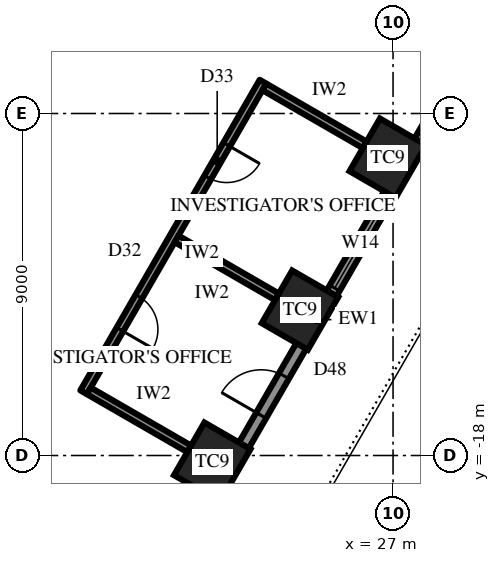
"""IFC4 building model, lengths in metres.
Left out: names, types, materials, properties, quantities, classifications, styles, units other than length and angle.
Written with IfcOpenShell. Run it as: python <this file> out.ifc"""

import sys

from ifc_helpers import new_model, si_unit, direction, frame, frame_2d, origin, origin_2d, place, context, subcontext, project, spatial, rectangle, extrude, element, fill, save


model = new_model("IFC4")
c1 = context("Model", 3, precision=1e-05, world=origin(), true_north=direction((0.0, 1.0)))
c2 = subcontext(c1, "Body", "Model", "MODEL_VIEW")
j1 = project(units=[si_unit("LENGTHUNIT", "METRE"), si_unit("PLANEANGLEUNIT", "RADIAN")], contexts=[c1])
p1 = place(None, origin())
s1 = spatial("IfcSite", under=j1, at=p1, CompositionType="ELEMENT")
p2 = place(p1, origin())
s2 = spatial("IfcBuilding", under=s1, at=p2, CompositionType="ELEMENT")
p3 = place(p2, frame((0.0, 0.0, 232.3)))
s3 = spatial("IfcBuildingStorey", under=s2, at=p3, CompositionType="ELEMENT", Elevation=232.3)
for number, where, z_axis, x_axis in (
    (1, (22.242, -18.175, 0.0), (0.0, 0.0, 1.0), (0.5, 0.866, 0.0)),
    (2, (24.552, -14.175, 0.0), (0.0, 0.0, 1.0), (0.5, 0.866, 0.0)),
    (3, (26.861, -10.175, 0.0), (0.0, 0.0, 1.0), (0.5, 0.866, 0.0)),
):
    element("IfcColumn", number, at=place(p3, frame(where, z_axis=z_axis, x_axis=x_axis)), inside=s3, PredefinedType="COLUMN", context=c2, shape_type="SweptSolid", body=[
        extrude(rectangle(XDim=1.6, YDim=1.4, at=origin_2d()), origin(), (0.0, 0.0, 1.0), 4.2),
    ])
p4 = place(p3, frame((18.707, -25.299, 0.0), z_axis=(0.0, 0.0, 1.0), x_axis=(0.500000442367, 0.866025148383, 0.0)))
e4 = element("IfcWall", 4, at=p4, inside=s3, PredefinedType="SOLIDWALL", context=c2, shape_type="SweptSolid", body=[
    extrude(rectangle(XDim=25.113, YDim=0.3, at=frame_2d((12.556, 0.0))), origin(), (0.0, 0.0, 1.0), 2.8),
])
p5 = place(p4, frame((4.278, 0.0, 0.6)))
e5 = element("IfcOpeningElement", 5, at=p5, cuts=e4, PredefinedType="OPENING", context=c2, shape_type="SweptSolid", body=[
    extrude(rectangle(XDim=2.7, YDim=1.95, at=frame_2d((1.35, 0.975))), frame((0.0, 0.16, 0.0), z_axis=(0.0, -1.0, 0.0), x_axis=(1.0, 0.0, 0.0)), (0.0, 0.0, 1.0), 0.32),
])
p6 = place(p4, frame((9.647, 0.0, 0.0)))
e6 = element("IfcOpeningElement", 6, at=p6, cuts=e4, PredefinedType="OPENING", context=c2, shape_type="SweptSolid", body=[
    extrude(rectangle(XDim=1.2, YDim=2.4, at=frame_2d((0.6, 1.2))), frame((0.0, 0.16, 0.0), z_axis=(0.0, -1.0, 0.0), x_axis=(1.0, 0.0, 0.0)), (0.0, 0.0, 1.0), 0.32),
])
p7 = place(p4, frame((13.516, 0.0, 0.6)))
e7 = element("IfcOpeningElement", 7, at=p7, cuts=e4, PredefinedType="OPENING", context=c2, shape_type="SweptSolid", body=[
    extrude(rectangle(XDim=2.7, YDim=1.95, at=frame_2d((1.35, 0.975))), frame((0.0, 0.16, 0.0), z_axis=(0.0, -1.0, 0.0), x_axis=(1.0, 0.0, 0.0)), (0.0, 0.0, 1.0), 0.32),
])
p8 = place(p4, frame((18.135, 0.0, 0.6)))
e8 = element("IfcOpeningElement", 8, at=p8, cuts=e4, PredefinedType="OPENING", context=c2, shape_type="SweptSolid", body=[
    extrude(rectangle(XDim=2.7, YDim=1.95, at=frame_2d((1.35, 0.975))), frame((0.0, 0.16, 0.0), z_axis=(0.0, -1.0, 0.0), x_axis=(1.0, 0.0, 0.0)), (0.0, 0.0, 1.0), 0.32),
])
p9 = place(p3, frame((18.858, -16.337, 0.0), z_axis=(0.0, 0.0, 1.0), x_axis=(0.499989672313, 0.866031366395, 0.0)))
e9 = element("IfcWall", 9, at=p9, inside=s3, PredefinedType="PARTITIONING", context=c2, shape_type="SweptSolid", body=[
    extrude(rectangle(XDim=9.438, YDim=0.2, at=frame_2d((4.719, 0.0))), origin(), (0.0, 0.0, 1.0), 4.0),
])
p10 = place(p9, frame((1.909, 0.0, 0.0)))
e10 = element("IfcOpeningElement", 10, at=p10, cuts=e9, PredefinedType="OPENING", context=c2, shape_type="SweptSolid", body=[
    extrude(rectangle(XDim=1.0, YDim=2.2, at=frame_2d((0.5, 1.1))), frame((0.0, 0.11, 0.0), z_axis=(0.0, -1.0, 0.0), x_axis=(1.0, 0.0, 0.0)), (0.0, 0.0, 1.0), 0.22),
])
p11 = place(p9, frame((6.528, 0.0, 0.0)))
e11 = element("IfcOpeningElement", 11, at=p11, cuts=e9, PredefinedType="OPENING", context=c2, shape_type="SweptSolid", body=[
    extrude(rectangle(XDim=1.0, YDim=2.2, at=frame_2d((0.5, 1.1))), frame((0.0, 0.11, 0.0), z_axis=(0.0, -1.0, 0.0), x_axis=(1.0, 0.0, 0.0)), (0.0, 0.0, 1.0), 0.22),
])
for number, where, z_axis, x_axis in (
    (12, (18.995, -16.3, 0.0), (0.0, 0.0, 1.0), (0.866, -0.5, 0.0)),
    (13, (21.304, -12.3, 0.0), (0.0, 0.0, 1.0), (0.866, -0.5, 0.0)),
    (14, (23.614, -8.3, 0.0), (0.0, 0.0, 1.0), (0.866, -0.5, 0.0)),
):
    element("IfcWall", number, at=place(p3, frame(where, z_axis=z_axis, x_axis=x_axis)), inside=s3, PredefinedType="PARTITIONING", context=c2, shape_type="SweptSolid", body=[
        extrude(rectangle(XDim=3.05, YDim=0.2, at=frame_2d((1.525, 0.0))), origin(), (0.0, 0.0, 1.0), 3.082),
    ])
p12 = place(p6, origin())
e15 = element("IfcDoor", 15, at=p12, inside=s3, OperationType="SINGLE_SWING_RIGHT", PredefinedType="DOOR", context=c2, shape_type="SweptSolid", body=[
    extrude(rectangle(XDim=1.2, YDim=2.4, at=frame_2d((0.6, 1.2))), frame((0.0, 0.025, 0.0), z_axis=(0.0, -1.0, 0.0), x_axis=(1.0, 0.0, 0.0)), (0.0, 0.0, 1.0), 0.05),
])
fill(e6, e15)
p13 = place(p7, origin())
e16 = element("IfcWindow", 16, at=p13, inside=s3, PartitioningType="SINGLE_PANEL", PredefinedType="WINDOW", context=c2, shape_type="SweptSolid", body=[
    extrude(rectangle(XDim=2.7, YDim=1.95, at=frame_2d((1.35, 0.975))), frame((0.0, 0.03, 0.0), z_axis=(0.0, -1.0, 0.0), x_axis=(1.0, 0.0, 0.0)), (0.0, 0.0, 1.0), 0.06),
])
fill(e7, e16)
p14 = place(p10, frame((1.0, 0.0, 0.0), z_axis=(0.0, 0.0, 1.0), x_axis=(-1.0, 0.0, 0.0)))
e17 = element("IfcDoor", 17, at=p14, inside=s3, OperationType="SINGLE_SWING_LEFT", PredefinedType="DOOR", context=c2, shape_type="SweptSolid", body=[
    extrude(rectangle(XDim=1.0, YDim=2.2, at=frame_2d((0.5, 1.1))), frame((0.0, 0.025, 0.0), z_axis=(0.0, -1.0, 0.0), x_axis=(1.0, 0.0, 0.0)), (0.0, 0.0, 1.0), 0.05),
])
fill(e10, e17)
p15 = place(p11, frame((1.0, 0.0, 0.0), z_axis=(0.0, 0.0, 1.0), x_axis=(-1.0, 0.0, 0.0)))
e18 = element("IfcDoor", 18, at=p15, inside=s3, OperationType="SINGLE_SWING_RIGHT", PredefinedType="DOOR", context=c2, shape_type="SweptSolid", body=[
    extrude(rectangle(XDim=1.0, YDim=2.2, at=frame_2d((0.5, 1.1))), frame((0.0, 0.025, 0.0), z_axis=(0.0, -1.0, 0.0), x_axis=(1.0, 0.0, 0.0)), (0.0, 0.0, 1.0), 0.05),
])
fill(e11, e18)
save(model, sys.argv[1])
